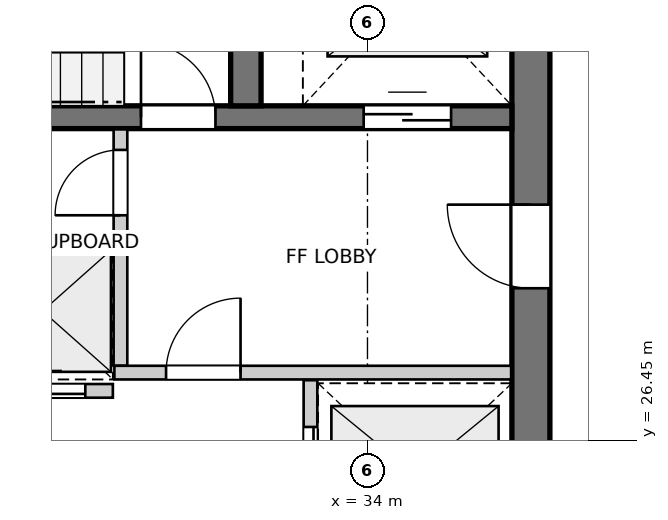
"""IFC4 building model, lengths in metres.
Left out: names, types, materials, properties, quantities, classifications, styles, units other than length and angle.
Written with IfcOpenShell. Run it as: python <this file> out.ifc"""

import sys

from ifc_helpers import new_model, si_unit, direction, frame, frame_2d, origin, place, context, subcontext, project, spatial, rectangle, extrude, source, transform, mapped, element, fill, save


model = new_model("IFC4")
c1 = context("Model", 3, precision=1e-05, world=origin(), true_north=direction((0.0, 1.0)))
c2 = subcontext(c1, "Body", "Model", "MODEL_VIEW")
j1 = project(units=[si_unit("LENGTHUNIT", "METRE"), si_unit("PLANEANGLEUNIT", "RADIAN")], contexts=[c1])
p1 = place(None, origin())
s1 = spatial("IfcSite", under=j1, at=p1, CompositionType="ELEMENT")
p2 = place(p1, origin())
s2 = spatial("IfcBuilding", under=s1, at=p2, CompositionType="ELEMENT")
p3 = place(p2, frame((0.0, 0.0, 208.4)))
s3 = spatial("IfcBuildingStorey", under=s2, at=p3, CompositionType="ELEMENT", Elevation=208.4)
p4 = place(p3, frame((36.15, 18.2, 0.0), z_axis=(0.0, 0.0, 1.0), x_axis=(0.0, 1.0, 0.0)))
e1 = element("IfcWall", 1, at=p4, inside=s3, PredefinedType="SHEAR", context=c2, shape_type="SweptSolid", body=[
    extrude(rectangle(XDim=15.6, YDim=0.5, at=frame_2d((7.8, 0.0))), origin(), (0.0, 0.0, 1.0), 2.935),
])
p5 = place(p4, frame((4.25, 0.0, 0.0)))
e2 = element("IfcOpeningElement", 2, at=p5, cuts=e1, PredefinedType="OPENING", context=c2, shape_type="SweptSolid", body=[
    extrude(rectangle(XDim=1.1, YDim=2.15, at=frame_2d((0.55, 1.075))), frame((0.0, 0.26, 0.0), z_axis=(0.0, -1.0, 0.0), x_axis=(1.0, 0.0, 0.0)), (0.0, 0.0, 1.0), 0.52),
])
p6 = place(p4, frame((10.25, 0.0, 0.0)))
e3 = element("IfcOpeningElement", 3, at=p6, cuts=e1, PredefinedType="OPENING", context=c2, shape_type="SweptSolid", body=[
    extrude(rectangle(XDim=1.1, YDim=2.15, at=frame_2d((0.55, 1.075))), frame((0.0, 0.26, 0.0), z_axis=(0.0, -1.0, 0.0), x_axis=(1.0, 0.0, 0.0)), (0.0, 0.0, 1.0), 0.52),
])
p7 = place(p3, frame((24.8, 30.7, 0.0), z_axis=(0.0, 0.0, 1.0), x_axis=(1.0, 0.0, 0.0)))
e4 = element("IfcWall", 4, at=p7, inside=s3, PredefinedType="SHEAR", context=c2, shape_type="SweptSolid", body=[
    extrude(rectangle(XDim=11.1, YDim=0.3, at=frame_2d((5.55, 0.0))), origin(), (0.0, 0.0, 1.0), 2.935),
])
p8 = place(p7, frame((6.22, 0.0, 0.0)))
e5 = element("IfcOpeningElement", 5, at=p8, cuts=e4, PredefinedType="OPENING", context=c2, shape_type="SweptSolid", body=[
    extrude(rectangle(XDim=0.98, YDim=2.15, at=frame_2d((0.49, 1.075))), frame((0.0, 0.16, 0.0), z_axis=(0.0, -1.0, 0.0), x_axis=(1.0, 0.0, 0.0)), (0.0, 0.0, 1.0), 0.32),
])
p9 = place(p7, frame((9.15, 0.0, 0.0)))
e6 = element("IfcOpeningElement", 6, at=p9, cuts=e4, PredefinedType="OPENING", context=c2, shape_type="SweptSolid", body=[
    extrude(rectangle(XDim=1.15, YDim=2.15, at=frame_2d((0.575, 1.075))), frame((0.0, 0.16, 0.0), z_axis=(0.0, -1.0, 0.0), x_axis=(1.0, 0.0, 0.0)), (0.0, 0.0, 1.0), 0.32),
])
p10 = place(p3, frame((32.4, 30.85, 0.0), z_axis=(0.0, 0.0, 1.0), x_axis=(0.0, 1.0, 0.0)))
e7 = element("IfcWall", 7, at=p10, inside=s3, PredefinedType="SHEAR", context=c2, shape_type="SweptSolid", body=[
    extrude(rectangle(XDim=2.95, YDim=0.4, at=frame_2d((1.475, 0.0))), origin(), (0.0, 0.0, 1.0), 2.935),
])
p11 = place(p3, frame((30.75, 27.43, 0.0), z_axis=(0.0, 0.0, 1.0), x_axis=(0.0, 1.0, 0.0)))
e8 = element("IfcWall", 8, at=p11, inside=s3, PredefinedType="PARTITIONING", context=c2, shape_type="SweptSolid", body=[
    extrude(rectangle(XDim=3.11, YDim=0.18, at=frame_2d((1.555, 0.0))), origin(), (0.0, 0.0, 1.0), 2.935),
])
p12 = place(p11, frame((1.98, 0.0, 0.0)))
e9 = element("IfcOpeningElement", 9, at=p12, cuts=e8, PredefinedType="OPENING", context=c2, shape_type="SweptSolid", body=[
    extrude(rectangle(XDim=0.86, YDim=2.05, at=frame_2d((0.43, 1.025))), frame((0.0, 0.1, 0.0), z_axis=(0.0, -1.0, 0.0), x_axis=(1.0, 0.0, 0.0)), (0.0, 0.0, 1.0), 0.2),
])
p13 = place(p3, frame((30.67, 27.34, 0.0), z_axis=(0.0, 0.0, 1.0), x_axis=(1.0, 0.0, 0.0)))
e10 = element("IfcWall", 10, at=p13, inside=s3, PredefinedType="PARTITIONING", context=c2, shape_type="SweptSolid", body=[
    extrude(rectangle(XDim=5.22, YDim=0.18, at=frame_2d((2.61, 0.0))), origin(), (0.0, 0.0, 1.0), 2.935),
])
p14 = place(p13, frame((0.68, 0.0, 0.0)))
e11 = element("IfcOpeningElement", 11, at=p14, cuts=e10, PredefinedType="OPENING", context=c2, shape_type="SweptSolid", body=[
    extrude(rectangle(XDim=0.98, YDim=2.15, at=frame_2d((0.49, 1.075))), frame((0.0, 0.1, 0.0), z_axis=(0.0, -1.0, 0.0), x_axis=(1.0, 0.0, 0.0)), (0.0, 0.0, 1.0), 0.2),
])
p15 = place(p3, frame((33.25, 24.76, 0.0), z_axis=(0.0, 0.0, 1.0), x_axis=(0.0, 1.0, 0.0)))
e12 = element("IfcWall", 12, at=p15, inside=s3, PredefinedType="PARTITIONING", context=c2, shape_type="SweptSolid", body=[
    extrude(rectangle(XDim=2.48, YDim=0.18, at=frame_2d((1.24, 0.0))), origin(), (0.0, 0.0, 1.0), 2.935),
])
p16 = place(p15, frame((0.615, 0.0, 0.0)))
e13 = element("IfcOpeningElement", 13, at=p16, cuts=e12, PredefinedType="OPENING", context=c2, shape_type="SweptSolid", body=[
    extrude(rectangle(XDim=1.25, YDim=2.15, at=frame_2d((0.625, 1.075))), frame((0.0, 0.1, 0.0), z_axis=(0.0, -1.0, 0.0), x_axis=(1.0, 0.0, 0.0)), (0.0, 0.0, 1.0), 0.2),
])
p17 = place(p3, frame((24.81, 29.08, 0.0), z_axis=(0.0, 0.0, 1.0), x_axis=(1.0, 0.0, 0.0)))
e14 = element("IfcWall", 14, at=p17, inside=s3, PredefinedType="PARTITIONING", context=c2, shape_type="SweptSolid", body=[
    extrude(rectangle(XDim=5.84, YDim=0.18, at=frame_2d((2.92, 0.0))), origin(), (0.0, 0.0, 1.0), 2.935),
])
p18 = place(p3, frame((28.825, 27.1, 0.0), z_axis=(0.0, 0.0, 1.0), x_axis=(1.0, 0.0, 0.0)))
e15 = element("IfcWall", 15, at=p18, inside=s3, PredefinedType="PARTITIONING", context=c2, shape_type="SweptSolid", body=[
    extrude(rectangle(XDim=1.825, YDim=0.18, at=frame_2d((0.913, 0.0))), origin(), (0.0, 0.0, 1.0), 2.935),
])
p19 = place(p18, frame((0.363, 0.0, 0.0)))
e16 = element("IfcOpeningElement", 16, at=p19, cuts=e15, PredefinedType="OPENING", context=c2, shape_type="SweptSolid", body=[
    extrude(rectangle(XDim=1.1, YDim=2.15, at=frame_2d((0.55, 1.075))), frame((0.0, 0.1, 0.0), z_axis=(0.0, -1.0, 0.0), x_axis=(1.0, 0.0, 0.0)), (0.0, 0.0, 1.0), 0.2),
])
m1 = source(origin(), c2, "Body", "SweptSolid", [
    extrude(rectangle(XDim=0.98, YDim=2.15, at=frame_2d((0.49, 1.075))), frame((0.0, 0.025, 0.0), z_axis=(0.0, -1.0, 0.0), x_axis=(1.0, 0.0, 0.0)), (0.0, 0.0, 1.0), 0.05),
])
p20 = place(p8, origin())
e17 = element("IfcDoor", 17, at=p20, inside=s3, OperationType="SINGLE_SWING_LEFT", PredefinedType="DOOR", context=c2, shape_type="MappedRepresentation", body=[
    mapped(m1, transform((0.0, 0.0, 0.0), x_axis=(1.0, 0.0, 0.0), y_axis=(0.0, 1.0, 0.0), z_axis=(0.0, 0.0, 1.0), scale=1.0)),
])
fill(e5, e17)
m2 = source(origin(), c2, "Body", "SweptSolid", [
    extrude(rectangle(XDim=1.15, YDim=2.15, at=frame_2d((0.575, 1.075))), frame((0.0, 0.025, 0.0), z_axis=(0.0, -1.0, 0.0), x_axis=(1.0, 0.0, 0.0)), (0.0, 0.0, 1.0), 0.05),
])
p21 = place(p9, origin())
e18 = element("IfcDoor", 18, at=p21, inside=s3, OperationType="DOUBLE_DOOR_SLIDING", PredefinedType="DOOR", context=c2, shape_type="MappedRepresentation", body=[
    mapped(m2, transform((0.0, 0.0, 0.0), x_axis=(1.0, 0.0, 0.0), y_axis=(0.0, 1.0, 0.0), z_axis=(0.0, 0.0, 1.0), scale=1.0)),
])
fill(e6, e18)
m3 = source(origin(), c2, "Body", "SweptSolid", [
    extrude(rectangle(XDim=1.1, YDim=2.15, at=frame_2d((0.55, 1.075))), frame((0.0, 0.025, 0.0), z_axis=(0.0, -1.0, 0.0), x_axis=(1.0, 0.0, 0.0)), (0.0, 0.0, 1.0), 0.05),
])
p22 = place(p6, origin())
e19 = element("IfcDoor", 19, at=p22, inside=s3, OperationType="SINGLE_SWING_RIGHT", PredefinedType="DOOR", context=c2, shape_type="MappedRepresentation", body=[
    mapped(m3, transform((0.0, 0.0, 0.0), x_axis=(1.0, 0.0, 0.0), y_axis=(0.0, 1.0, 0.0), z_axis=(0.0, 0.0, 1.0), scale=1.0)),
])
fill(e3, e19)
m4 = source(origin(), c2, "Body", "SweptSolid", [
    extrude(rectangle(XDim=0.86, YDim=2.05, at=frame_2d((0.43, 1.025))), frame((0.0, 0.025, 0.0), z_axis=(0.0, -1.0, 0.0), x_axis=(1.0, 0.0, 0.0)), (0.0, 0.0, 1.0), 0.05),
])
p23 = place(p12, origin())
e20 = element("IfcDoor", 20, at=p23, inside=s3, OperationType="SINGLE_SWING_LEFT", PredefinedType="DOOR", context=c2, shape_type="MappedRepresentation", body=[
    mapped(m4, transform((0.0, 0.0, 0.0), x_axis=(1.0, 0.0, 0.0), y_axis=(0.0, 1.0, 0.0), z_axis=(0.0, 0.0, 1.0), scale=1.0)),
])
fill(e9, e20)
p24 = place(p14, origin())
e21 = element("IfcDoor", 21, at=p24, inside=s3, OperationType="SINGLE_SWING_RIGHT", PredefinedType="DOOR", context=c2, shape_type="MappedRepresentation", body=[
    mapped(m1, transform((0.0, 0.0, 0.0), x_axis=(1.0, 0.0, 0.0), y_axis=(0.0, 1.0, 0.0), z_axis=(0.0, 0.0, 1.0), scale=1.0)),
])
fill(e11, e21)
m5 = source(origin(), c2, "Body", "SweptSolid", [
    extrude(rectangle(XDim=1.25, YDim=2.15, at=frame_2d((0.625, 1.075))), frame((0.0, 0.025, 0.0), z_axis=(0.0, -1.0, 0.0), x_axis=(1.0, 0.0, 0.0)), (0.0, 0.0, 1.0), 0.05),
])
p25 = place(p16, origin())
e22 = element("IfcDoor", 22, at=p25, inside=s3, OperationType="DOUBLE_DOOR_SLIDING", PredefinedType="DOOR", context=c2, shape_type="MappedRepresentation", body=[
    mapped(m5, transform((0.0, 0.0, 0.0), x_axis=(1.0, 0.0, 0.0), y_axis=(0.0, 1.0, 0.0), z_axis=(0.0, 0.0, 1.0), scale=1.0)),
])
fill(e13, e22)
p26 = place(p19, origin())
e23 = element("IfcDoor", 23, at=p26, inside=s3, OperationType="DOUBLE_DOOR_SLIDING", PredefinedType="DOOR", context=c2, shape_type="MappedRepresentation", body=[
    mapped(m3, transform((0.0, 0.0, 0.0), x_axis=(1.0, 0.0, 0.0), y_axis=(0.0, 1.0, 0.0), z_axis=(0.0, 0.0, 1.0), scale=1.0)),
])
fill(e16, e23)
save(model, sys.argv[1])
